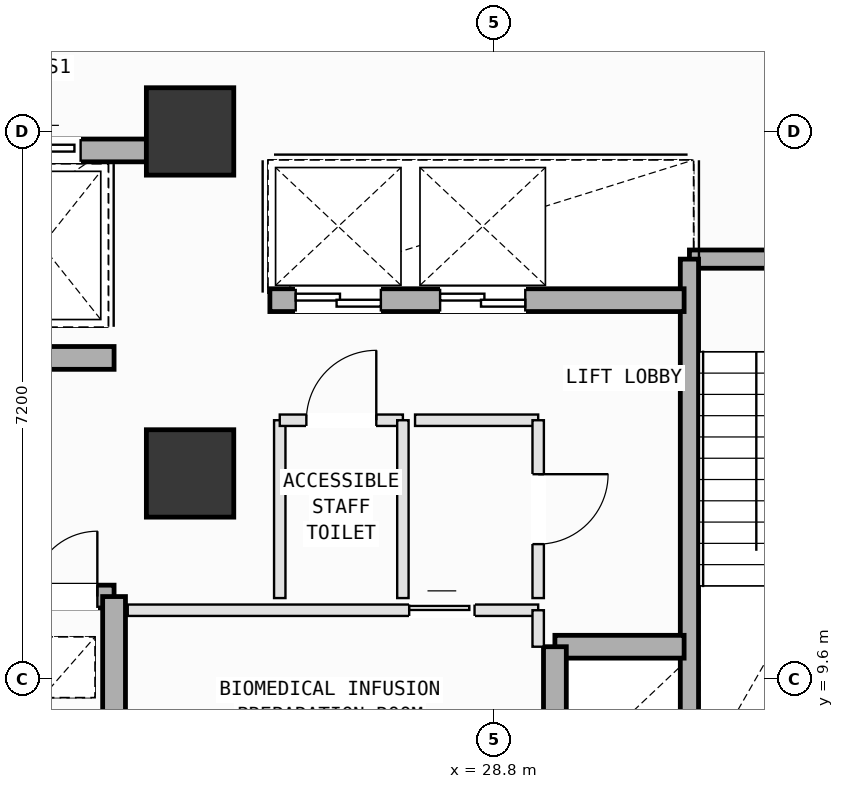
"""IFC4 building model, lengths in metres.
Left out: names, types, materials, properties, quantities, classifications, styles, units other than length and angle.
Written with IfcOpenShell. Run it as: python <this file> out.ifc"""

import sys

from ifc_helpers import new_model, si_unit, direction, frame, frame_2d, origin, origin_2d, place, context, subcontext, project, spatial, rectangle, extrude, element, fill, save


model = new_model("IFC4")
c1 = context("Model", 3, precision=1e-05, world=origin(), true_north=direction((0.0, 1.0)))
c2 = subcontext(c1, "Body", "Model", "MODEL_VIEW")
j1 = project(units=[si_unit("LENGTHUNIT", "METRE"), si_unit("PLANEANGLEUNIT", "RADIAN")], contexts=[c1])
p1 = place(None, origin())
s1 = spatial("IfcSite", under=j1, at=p1, CompositionType="ELEMENT")
p2 = place(p1, origin())
s2 = spatial("IfcBuilding", under=s1, at=p2, CompositionType="ELEMENT")
p3 = place(p2, frame((0.0, 0.0, 189.8)))
s3 = spatial("IfcBuildingStorey", under=s2, at=p3, CompositionType="ELEMENT", Elevation=189.8)
for number, where, z_axis, x_axis in (
    (1, (24.8, 12.3, 0.0), (0.0, 0.0, 1.0), (1.0, 0.0, 0.0)),
    (2, (24.8, 16.8, 0.0), (0.0, 0.0, 1.0), (1.0, 0.0, 0.0)),
):
    element("IfcColumn", number, at=place(p3, frame(where, z_axis=z_axis, x_axis=x_axis)), inside=s3, PredefinedType="COLUMN", context=c2, shape_type="SweptSolid", body=[
        extrude(rectangle(XDim=1.15, YDim=1.15, at=origin_2d()), origin(), (0.0, 0.0, 1.0), 4.0),
    ])
p4 = place(p3, frame((31.37, 15.12, 0.0), z_axis=(0.0, 0.0, 1.0), x_axis=(1.0, 0.0, 0.0)))
e3 = element("IfcWall", 3, at=p4, inside=s3, PredefinedType="SOLIDWALL", context=c2, shape_type="SweptSolid", body=[
    extrude(rectangle(XDim=3.46, YDim=0.24, at=frame_2d((1.73, 0.0))), origin(), (0.0, 0.0, 1.0), 3.78),
])
p5 = place(p4, frame((2.14, 0.0, 0.0)))
e4 = element("IfcOpeningElement", 4, at=p5, cuts=e3, PredefinedType="OPENING", context=c2, shape_type="SweptSolid", body=[
    extrude(rectangle(XDim=1.1, YDim=2.15, at=frame_2d((0.55, 1.075))), frame((0.0, 0.13, 0.0), z_axis=(0.0, -1.0, 0.0), x_axis=(1.0, 0.0, 0.0)), (0.0, 0.0, 1.0), 0.26),
])
p6 = place(p3, frame((31.37, 8.075, 0.0), z_axis=(0.0, 0.0, 1.0), x_axis=(0.0, 1.0, 0.0)))
e5 = element("IfcWall", 5, at=p6, inside=s3, PredefinedType="SOLIDWALL", context=c2, shape_type="SweptSolid", body=[
    extrude(rectangle(XDim=7.045, YDim=0.24, at=frame_2d((3.522, 0.0))), origin(), (0.0, 0.0, 1.0), 3.78),
])
p7 = place(p3, frame((19.85, 16.55, 0.0), z_axis=(0.0, 0.0, 1.0), x_axis=(1.0, 0.0, 0.0)))
e6 = element("IfcWall", 6, at=p7, inside=s3, PredefinedType="SOLIDWALL", context=c2, shape_type="SweptSolid", body=[
    extrude(rectangle(XDim=4.375, YDim=0.3, at=frame_2d((2.188, 0.0))), origin(), (0.0, 0.0, 1.0), 3.78),
])
p8 = place(p7, frame((0.475, 0.0, 0.0)))
e7 = element("IfcOpeningElement", 7, at=p8, cuts=e6, PredefinedType="OPENING", context=c2, shape_type="SweptSolid", body=[
    extrude(rectangle(XDim=1.25, YDim=2.18, at=frame_2d((0.625, 1.09))), frame((0.0, 0.16, 0.0), z_axis=(0.0, -1.0, 0.0), x_axis=(1.0, 0.0, 0.0)), (0.0, 0.0, 1.0), 0.32),
])
p9 = place(p7, frame((2.49, 0.0, 0.0)))
e8 = element("IfcOpeningElement", 8, at=p9, cuts=e6, PredefinedType="OPENING", context=c2, shape_type="SweptSolid", body=[
    extrude(rectangle(XDim=1.02, YDim=2.12, at=frame_2d((0.51, 1.06))), frame((0.0, 0.16, 0.0), z_axis=(0.0, -1.0, 0.0), x_axis=(1.0, 0.0, 0.0)), (0.0, 0.0, 1.0), 0.32),
])
p10 = place(p3, frame((18.5, 10.68, 0.0), z_axis=(0.0, 0.0, 1.0), x_axis=(1.0, 0.0, 0.0)))
e9 = element("IfcWall", 9, at=p10, inside=s3, PredefinedType="SOLIDWALL", context=c2, shape_type="SweptSolid", body=[
    extrude(rectangle(XDim=5.3, YDim=0.3, at=frame_2d((2.65, 0.0))), origin(), (0.0, 0.0, 1.0), 3.78),
])
p11 = place(p10, frame((4.22, 0.0, 0.0)))
e10 = element("IfcOpeningElement", 10, at=p11, cuts=e9, PredefinedType="OPENING", context=c2, shape_type="SweptSolid", body=[
    extrude(rectangle(XDim=0.86, YDim=2.06, at=frame_2d((0.43, 1.03))), frame((0.0, 0.16, 0.0), z_axis=(0.0, -1.0, 0.0), x_axis=(1.0, 0.0, 0.0)), (0.0, 0.0, 1.0), 0.32),
])
p12 = place(p10, frame((0.425, 0.0, 0.0)))
e11 = element("IfcOpeningElement", 11, at=p12, cuts=e9, PredefinedType="OPENING", context=c2, shape_type="SweptSolid", body=[
    extrude(rectangle(XDim=1.25, YDim=2.18, at=frame_2d((0.625, 1.09))), frame((0.0, 0.16, 0.0), z_axis=(0.0, -1.0, 0.0), x_axis=(1.0, 0.0, 0.0)), (0.0, 0.0, 1.0), 0.32),
])
p13 = place(p10, frame((2.525, 0.0, 0.0)))
e12 = element("IfcOpeningElement", 12, at=p13, cuts=e9, PredefinedType="OPENING", context=c2, shape_type="SweptSolid", body=[
    extrude(rectangle(XDim=1.25, YDim=2.18, at=frame_2d((0.625, 1.09))), frame((0.0, 0.16, 0.0), z_axis=(0.0, -1.0, 0.0), x_axis=(1.0, 0.0, 0.0)), (0.0, 0.0, 1.0), 0.32),
])
p14 = place(p3, frame((18.5, 13.82, 0.0), z_axis=(0.0, 0.0, 1.0), x_axis=(1.0, 0.0, 0.0)))
e13 = element("IfcWall", 13, at=p14, inside=s3, PredefinedType="SOLIDWALL", context=c2, shape_type="SweptSolid", body=[
    extrude(rectangle(XDim=5.3, YDim=0.3, at=frame_2d((2.65, 0.0))), origin(), (0.0, 0.0, 1.0), 3.78),
])
p15 = place(p14, frame((0.18, 0.0, 0.0)))
e14 = element("IfcOpeningElement", 14, at=p15, cuts=e13, PredefinedType="OPENING", context=c2, shape_type="SweptSolid", body=[
    extrude(rectangle(XDim=1.1, YDim=2.15, at=frame_2d((0.55, 1.075))), frame((0.0, 0.16, 0.0), z_axis=(0.0, -1.0, 0.0), x_axis=(1.0, 0.0, 0.0)), (0.0, 0.0, 1.0), 0.32),
])
p16 = place(p3, frame((23.8, 8.075, 0.0), z_axis=(0.0, 0.0, 1.0), x_axis=(0.0, 1.0, 0.0)))
e15 = element("IfcWall", 15, at=p16, inside=s3, PredefinedType="SOLIDWALL", context=c2, shape_type="SweptSolid", body=[
    extrude(rectangle(XDim=2.605, YDim=0.3, at=frame_2d((1.302, 0.0))), origin(), (0.0, 0.0, 1.0), 3.78),
])
p17 = place(p3, frame((29.6, 10.02, 0.0), z_axis=(0.0, 0.0, 1.0), x_axis=(1.0, 0.0, 0.0)))
e16 = element("IfcWall", 16, at=p17, inside=s3, PredefinedType="SOLIDWALL", context=c2, shape_type="SweptSolid", body=[
    extrude(rectangle(XDim=1.7, YDim=0.3, at=frame_2d((0.85, 0.0))), origin(), (0.0, 0.0, 1.0), 3.78),
])
p18 = place(p3, frame((29.6, 8.075, 0.0), z_axis=(0.0, 0.0, 1.0), x_axis=(0.0, 1.0, 0.0)))
e17 = element("IfcWall", 17, at=p18, inside=s3, PredefinedType="SOLIDWALL", context=c2, shape_type="SweptSolid", body=[
    extrude(rectangle(XDim=1.945, YDim=0.3, at=frame_2d((0.973, 0.0))), origin(), (0.0, 0.0, 1.0), 3.78),
])
p19 = place(p3, frame((25.85, 14.58, 0.0), z_axis=(0.0, 0.0, 1.0), x_axis=(1.0, 0.0, 0.0)))
e18 = element("IfcWall", 18, at=p19, inside=s3, PredefinedType="SOLIDWALL", context=c2, shape_type="SweptSolid", body=[
    extrude(rectangle(XDim=5.45, YDim=0.3, at=frame_2d((2.725, 0.0))), origin(), (0.0, 0.0, 1.0), 3.78),
])
p20 = place(p19, frame((0.34, 0.0, 0.0)))
e19 = element("IfcOpeningElement", 19, at=p20, cuts=e18, PredefinedType="OPENING", context=c2, shape_type="SweptSolid", body=[
    extrude(rectangle(XDim=1.12, YDim=2.15, at=frame_2d((0.56, 1.075))), frame((0.0, 0.16, 0.0), z_axis=(0.0, -1.0, 0.0), x_axis=(1.0, 0.0, 0.0)), (0.0, 0.0, 1.0), 0.32),
])
p21 = place(p19, frame((2.24, 0.0, 0.0)))
e20 = element("IfcOpeningElement", 20, at=p21, cuts=e18, PredefinedType="OPENING", context=c2, shape_type="SweptSolid", body=[
    extrude(rectangle(XDim=1.12, YDim=2.15, at=frame_2d((0.56, 1.075))), frame((0.0, 0.16, 0.0), z_axis=(0.0, -1.0, 0.0), x_axis=(1.0, 0.0, 0.0)), (0.0, 0.0, 1.0), 0.32),
])
p22 = place(p3, frame((23.98, 10.5, 0.0), z_axis=(0.0, 0.0, 1.0), x_axis=(1.0, 0.0, 0.0)))
e21 = element("IfcWall", 21, at=p22, inside=s3, PredefinedType="PARTITIONING", context=c2, shape_type="SweptSolid", body=[
    extrude(rectangle(XDim=5.4, YDim=0.15, at=frame_2d((2.7, 0.0))), origin(), (0.0, 0.0, 1.0), 3.78),
])
p23 = place(p22, frame((3.703, 0.0, 0.0)))
e22 = element("IfcOpeningElement", 22, at=p23, cuts=e21, PredefinedType="OPENING", context=c2, shape_type="SweptSolid", body=[
    extrude(rectangle(XDim=0.86, YDim=2.06, at=frame_2d((0.43, 1.03))), frame((0.0, 0.085, 0.0), z_axis=(0.0, -1.0, 0.0), x_axis=(1.0, 0.0, 0.0)), (0.0, 0.0, 1.0), 0.17),
])
p24 = place(p3, frame((29.38, 10.5, 0.0), z_axis=(0.0, 0.0, 1.0), x_axis=(0.0, -1.0, 0.0)))
e23 = element("IfcWall", 23, at=p24, inside=s3, PredefinedType="PARTITIONING", context=c2, shape_type="SweptSolid", body=[
    extrude(rectangle(XDim=0.48, YDim=0.15, at=frame_2d((0.24, 0.0))), origin(), (0.0, 0.0, 1.0), 3.78),
])
p25 = place(p3, frame((25.98, 10.66, 0.0), z_axis=(0.0, 0.0, 1.0), x_axis=(0.0, 1.0, 0.0)))
e24 = element("IfcWall", 24, at=p25, inside=s3, PredefinedType="PARTITIONING", context=c2, shape_type="SweptSolid", body=[
    extrude(rectangle(XDim=2.34, YDim=0.15, at=frame_2d((1.17, 0.0))), origin(), (0.0, 0.0, 1.0), 3.78),
])
p26 = place(p3, frame((25.98, 13.0, 0.0), z_axis=(0.0, 0.0, 1.0), x_axis=(1.0, 0.0, 0.0)))
e25 = element("IfcWall", 25, at=p26, inside=s3, PredefinedType="PARTITIONING", context=c2, shape_type="SweptSolid", body=[
    extrude(rectangle(XDim=1.62, YDim=0.15, at=frame_2d((0.81, 0.0))), origin(), (0.0, 0.0, 1.0), 3.78),
])
p27 = place(p26, frame((0.35, 0.0, 0.0)))
e26 = element("IfcOpeningElement", 26, at=p27, cuts=e25, PredefinedType="OPENING", context=c2, shape_type="SweptSolid", body=[
    extrude(rectangle(XDim=0.92, YDim=2.1, at=frame_2d((0.46, 1.05))), frame((0.0, 0.085, 0.0), z_axis=(0.0, -1.0, 0.0), x_axis=(1.0, 0.0, 0.0)), (0.0, 0.0, 1.0), 0.17),
])
p28 = place(p3, frame((27.6, 13.0, 0.0), z_axis=(0.0, 0.0, 1.0), x_axis=(0.0, -1.0, 0.0)))
e27 = element("IfcWall", 27, at=p28, inside=s3, PredefinedType="PARTITIONING", context=c2, shape_type="SweptSolid", body=[
    extrude(rectangle(XDim=2.34, YDim=0.15, at=frame_2d((1.17, 0.0))), origin(), (0.0, 0.0, 1.0), 3.78),
])
p29 = place(p3, frame((27.76, 13.0, 0.0), z_axis=(0.0, 0.0, 1.0), x_axis=(1.0, 0.0, 0.0)))
e28 = element("IfcWall", 28, at=p29, inside=s3, PredefinedType="PARTITIONING", context=c2, shape_type="SweptSolid", body=[
    extrude(rectangle(XDim=1.62, YDim=0.15, at=frame_2d((0.81, 0.0))), origin(), (0.0, 0.0, 1.0), 3.78),
])
p30 = place(p3, frame((29.38, 13.0, 0.0), z_axis=(0.0, 0.0, 1.0), x_axis=(0.0, -1.0, 0.0)))
e29 = element("IfcWall", 29, at=p30, inside=s3, PredefinedType="PARTITIONING", context=c2, shape_type="SweptSolid", body=[
    extrude(rectangle(XDim=2.34, YDim=0.15, at=frame_2d((1.17, 0.0))), origin(), (0.0, 0.0, 1.0), 3.78),
])
p31 = place(p30, frame((0.71, 0.0, 0.0)))
e30 = element("IfcOpeningElement", 30, at=p31, cuts=e29, PredefinedType="OPENING", context=c2, shape_type="SweptSolid", body=[
    extrude(rectangle(XDim=0.92, YDim=2.1, at=frame_2d((0.46, 1.05))), frame((0.0, 0.085, 0.0), z_axis=(0.0, -1.0, 0.0), x_axis=(1.0, 0.0, 0.0)), (0.0, 0.0, 1.0), 0.17),
])
p32 = place(p11, origin())
e31 = element("IfcDoor", 31, at=p32, inside=s3, OperationType="SINGLE_SWING_RIGHT", PredefinedType="DOOR", context=c2, shape_type="SweptSolid", body=[
    extrude(rectangle(XDim=0.86, YDim=2.06, at=frame_2d((0.43, 1.03))), frame((0.0, 0.025, 0.0), z_axis=(0.0, -1.0, 0.0), x_axis=(1.0, 0.0, 0.0)), (0.0, 0.0, 1.0), 0.05),
])
fill(e10, e31)
p33 = place(p20, origin())
e32 = element("IfcDoor", 32, at=p33, inside=s3, OperationType="DOUBLE_DOOR_SLIDING", PredefinedType="DOOR", context=c2, shape_type="SweptSolid", body=[
    extrude(rectangle(XDim=1.12, YDim=2.15, at=frame_2d((0.56, 1.075))), frame((0.0, 0.025, 0.0), z_axis=(0.0, -1.0, 0.0), x_axis=(1.0, 0.0, 0.0)), (0.0, 0.0, 1.0), 0.05),
])
fill(e19, e32)
p34 = place(p21, origin())
e33 = element("IfcDoor", 33, at=p34, inside=s3, OperationType="DOUBLE_DOOR_SLIDING", PredefinedType="DOOR", context=c2, shape_type="SweptSolid", body=[
    extrude(rectangle(XDim=1.12, YDim=2.15, at=frame_2d((0.56, 1.075))), frame((0.0, 0.025, 0.0), z_axis=(0.0, -1.0, 0.0), x_axis=(1.0, 0.0, 0.0)), (0.0, 0.0, 1.0), 0.05),
])
fill(e20, e33)
p35 = place(p9, origin())
e34 = element("IfcDoor", 34, at=p35, inside=s3, OperationType="SLIDING_TO_LEFT", PredefinedType="DOOR", context=c2, shape_type="SweptSolid", body=[
    extrude(rectangle(XDim=1.02, YDim=2.12, at=frame_2d((0.51, 1.06))), frame((0.0, 0.025, 0.0), z_axis=(0.0, -1.0, 0.0), x_axis=(1.0, 0.0, 0.0)), (0.0, 0.0, 1.0), 0.05),
])
fill(e8, e34)
p36 = place(p27, origin())
e35 = element("IfcDoor", 35, at=p36, inside=s3, OperationType="SINGLE_SWING_RIGHT", PredefinedType="DOOR", context=c2, shape_type="SweptSolid", body=[
    extrude(rectangle(XDim=0.92, YDim=2.1, at=frame_2d((0.46, 1.05))), frame((0.0, 0.025, 0.0), z_axis=(0.0, -1.0, 0.0), x_axis=(1.0, 0.0, 0.0)), (0.0, 0.0, 1.0), 0.05),
])
fill(e26, e35)
p37 = place(p31, origin())
e36 = element("IfcDoor", 36, at=p37, inside=s3, OperationType="SINGLE_SWING_LEFT", PredefinedType="DOOR", context=c2, shape_type="SweptSolid", body=[
    extrude(rectangle(XDim=0.92, YDim=2.1, at=frame_2d((0.46, 1.05))), frame((0.0, 0.025, 0.0), z_axis=(0.0, -1.0, 0.0), x_axis=(1.0, 0.0, 0.0)), (0.0, 0.0, 1.0), 0.05),
])
fill(e30, e36)
p38 = place(p23, origin())
e37 = element("IfcDoor", 37, at=p38, inside=s3, OperationType="SLIDING_TO_LEFT", PredefinedType="DOOR", context=c2, shape_type="SweptSolid", body=[
    extrude(rectangle(XDim=0.86, YDim=2.06, at=frame_2d((0.43, 1.03))), frame((0.0, 0.025, 0.0), z_axis=(0.0, -1.0, 0.0), x_axis=(1.0, 0.0, 0.0)), (0.0, 0.0, 1.0), 0.05),
])
fill(e22, e37)
save(model, sys.argv[1])
